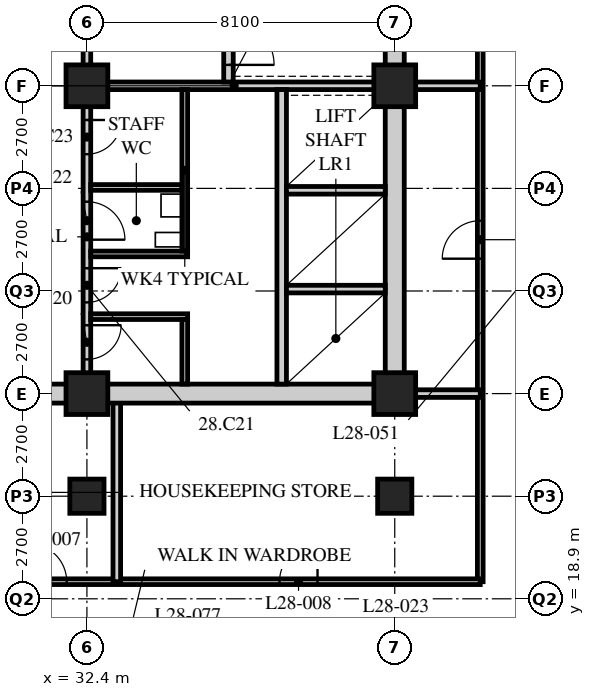
"""IFC4 building model, lengths in metres.
Left out: names, types, materials, properties, quantities, classifications, styles, units other than length and angle.
Written with IfcOpenShell. Run it as: python <this file> out.ifc"""

import sys

from ifc_helpers import new_model, si_unit, direction, frame, frame_2d, origin, origin_2d, place, context, subcontext, project, spatial, rectangle, hollow_rectangle, extrude, element, fill, save


model = new_model("IFC4")
c1 = context("Model", 3, precision=1e-05, world=origin(), true_north=direction((0.0, 1.0)))
c2 = subcontext(c1, "Body", "Model", "MODEL_VIEW")
j1 = project(units=[si_unit("LENGTHUNIT", "METRE"), si_unit("PLANEANGLEUNIT", "RADIAN")], contexts=[c1])
p1 = place(None, origin())
s1 = spatial("IfcSite", under=j1, at=p1, CompositionType="ELEMENT")
p2 = place(p1, origin())
s2 = spatial("IfcBuilding", under=s1, at=p2, CompositionType="ELEMENT")
p3 = place(p2, frame((0.0, 0.0, 113.6)))
s3 = spatial("IfcBuildingStorey", under=s2, at=p3, CompositionType="ELEMENT", Elevation=113.6)
p4 = place(p3, frame((32.4, 21.6, 0.0), z_axis=(0.0, 0.0, 1.0), x_axis=(1.0, 0.0, 0.0)))
e1 = element("IfcColumn", 1, at=p4, inside=s3, PredefinedType="COLUMN", context=c2, shape_type="SweptSolid", body=[
    extrude(hollow_rectangle(XDim=0.9, YDim=0.9, WallThickness=0.09, at=origin_2d()), origin(), (0.0, 0.0, 1.0), 3.4),
])
for number, where, z_axis, x_axis in (
    (2, (32.4, 24.3, 0.0), (0.0, 0.0, 1.0), (1.0, 0.0, 0.0)),
    (3, (32.4, 32.4, 0.0), (0.0, 0.0, 1.0), (1.0, 0.0, 0.0)),
):
    element("IfcColumn", number, at=place(p3, frame(where, z_axis=z_axis, x_axis=x_axis)), inside=s3, PredefinedType="COLUMN", context=c2, shape_type="SweptSolid", body=[
        extrude(hollow_rectangle(XDim=1.1, YDim=1.1, WallThickness=0.1, at=origin_2d()), origin(), (0.0, 0.0, 1.0), 3.4),
    ])
p5 = place(p3, frame((40.5, 21.6, 0.0), z_axis=(0.0, 0.0, 1.0), x_axis=(1.0, 0.0, 0.0)))
e4 = element("IfcColumn", 4, at=p5, inside=s3, PredefinedType="COLUMN", context=c2, shape_type="SweptSolid", body=[
    extrude(hollow_rectangle(XDim=0.9, YDim=0.9, WallThickness=0.09, at=origin_2d()), origin(), (0.0, 0.0, 1.0), 3.4),
])
for number, where, z_axis, x_axis in (
    (5, (40.5, 24.3, 0.0), (0.0, 0.0, 1.0), (1.0, 0.0, 0.0)),
    (6, (40.5, 32.4, 0.0), (0.0, 0.0, 1.0), (1.0, 0.0, 0.0)),
):
    element("IfcColumn", number, at=place(p3, frame(where, z_axis=z_axis, x_axis=x_axis)), inside=s3, PredefinedType="COLUMN", context=c2, shape_type="SweptSolid", body=[
        extrude(hollow_rectangle(XDim=1.1, YDim=1.1, WallThickness=0.1, at=origin_2d()), origin(), (0.0, 0.0, 1.0), 3.4),
    ])
p6 = place(p3, frame((42.75, 19.35, 0.0), z_axis=(0.0, 0.0, 1.0), x_axis=(0.0, 1.0, 0.0)))
e7 = element("IfcWall", 7, at=p6, inside=s3, PredefinedType="PARTITIONING", context=c2, shape_type="SweptSolid", body=[
    extrude(rectangle(XDim=24.75, YDim=0.15, at=frame_2d((12.375, 0.0))), origin(), (0.0, 0.0, 1.0), 3.19),
])
p7 = place(p6, frame((8.5, 0.0, 0.0)))
e8 = element("IfcOpeningElement", 8, at=p7, cuts=e7, PredefinedType="OPENING", context=c2, shape_type="SweptSolid", body=[
    extrude(rectangle(XDim=1.0, YDim=2.1, at=frame_2d((0.5, 1.05))), frame((0.0, 0.085, 0.0), z_axis=(0.0, -1.0, 0.0), x_axis=(1.0, 0.0, 0.0)), (0.0, 0.0, 1.0), 0.17),
])
p8 = place(p6, frame((16.6, 0.0, 0.0)))
e9 = element("IfcOpeningElement", 9, at=p8, cuts=e7, PredefinedType="OPENING", context=c2, shape_type="SweptSolid", body=[
    extrude(rectangle(XDim=1.0, YDim=2.1, at=frame_2d((0.5, 1.05))), frame((0.0, 0.085, 0.0), z_axis=(0.0, -1.0, 0.0), x_axis=(1.0, 0.0, 0.0)), (0.0, 0.0, 1.0), 0.17),
])
p9 = place(p3, frame((29.56, 19.35, 0.0), z_axis=(0.0, 0.0, 1.0), x_axis=(1.0, 0.0, 0.0)))
e10 = element("IfcWall", 10, at=p9, inside=s3, PredefinedType="PARTITIONING", context=c2, shape_type="SweptSolid", body=[
    extrude(rectangle(XDim=13.19, YDim=0.15, at=frame_2d((6.595, 0.0))), origin(), (0.0, 0.0, 1.0), 3.19),
])
p10 = place(p9, frame((1.308, 0.0, 0.0)))
e11 = element("IfcOpeningElement", 11, at=p10, cuts=e10, PredefinedType="OPENING", context=c2, shape_type="SweptSolid", body=[
    extrude(rectangle(XDim=1.0, YDim=2.1, at=frame_2d((0.5, 1.05))), frame((0.0, 0.085, 0.0), z_axis=(0.0, -1.0, 0.0), x_axis=(1.0, 0.0, 0.0)), (0.0, 0.0, 1.0), 0.17),
])
p11 = place(p9, frame((7.908, 0.0, 0.0)))
e12 = element("IfcOpeningElement", 12, at=p11, cuts=e10, PredefinedType="OPENING", context=c2, shape_type="SweptSolid", body=[
    extrude(rectangle(XDim=1.0, YDim=2.1, at=frame_2d((0.5, 1.05))), frame((0.0, 0.085, 0.0), z_axis=(0.0, -1.0, 0.0), x_axis=(1.0, 0.0, 0.0)), (0.0, 0.0, 1.0), 0.17),
])
p12 = place(p3, frame((40.5, 32.4, 0.0), z_axis=(0.0, 0.0, 1.0), x_axis=(1.0, 0.0, 0.0)))
e13 = element("IfcWall", 13, at=p12, inside=s3, PredefinedType="SOLIDWALL", context=c2, shape_type="SweptSolid", body=[
    extrude(rectangle(XDim=2.25, YDim=0.2, at=frame_2d((1.125, 0.0))), origin(), (0.0, 0.0, 1.0), 3.19),
])
p13 = place(p3, frame((33.186, 19.35, 0.0), z_axis=(0.0, 0.0, 1.0), x_axis=(0.0, 1.0, 0.0)))
e14 = element("IfcWall", 14, at=p13, inside=s3, PredefinedType="SOLIDWALL", context=c2, shape_type="SweptSolid", body=[
    extrude(rectangle(XDim=4.95, YDim=0.2, at=frame_2d((2.475, 0.0))), origin(), (0.0, 0.0, 1.0), 3.19),
])
p14 = place(p3, frame((40.5, 24.3, 0.0), z_axis=(0.0, 0.0, 1.0), x_axis=(1.0, 0.0, 0.0)))
e15 = element("IfcWall", 15, at=p14, inside=s3, PredefinedType="SOLIDWALL", context=c2, shape_type="SweptSolid", body=[
    extrude(rectangle(XDim=2.25, YDim=0.2, at=frame_2d((1.125, 0.0))), origin(), (0.0, 0.0, 1.0), 3.19),
])
p15 = place(p3, frame((15.95, 24.3, 0.0), z_axis=(0.0, 0.0, 1.0), x_axis=(1.0, 0.0, 0.0)))
e16 = element("IfcWall", 16, at=p15, inside=s3, PredefinedType="SOLIDWALL", context=c2, shape_type="SweptSolid", body=[
    extrude(rectangle(XDim=24.8, YDim=0.5, at=frame_2d((12.4, 0.0))), origin(), (0.0, 0.0, 1.0), 2.54),
])
p16 = place(p15, frame((11.5, 0.0, 0.0)))
e17 = element("IfcOpeningElement", 17, at=p16, cuts=e16, PredefinedType="OPENING", context=c2, shape_type="SweptSolid", body=[
    extrude(rectangle(XDim=1.8, YDim=2.4, at=frame_2d((0.9, 1.2))), frame((0.0, 0.26, 0.0), z_axis=(0.0, -1.0, 0.0), x_axis=(1.0, 0.0, 0.0)), (0.0, 0.0, 1.0), 0.52),
])
p17 = place(p3, frame((40.5, 24.55, 0.0), z_axis=(0.0, 0.0, 1.0), x_axis=(0.0, 1.0, 0.0)))
e18 = element("IfcWall", 18, at=p17, inside=s3, PredefinedType="SOLIDWALL", context=c2, shape_type="SweptSolid", body=[
    extrude(rectangle(XDim=15.7, YDim=0.5, at=frame_2d((7.85, 0.0))), origin(), (0.0, 0.0, 1.0), 2.578),
])
p18 = place(p3, frame((32.3, 32.4, 0.0), z_axis=(0.0, 0.0, 1.0), x_axis=(1.0, 0.0, 0.0)))
e19 = element("IfcWall", 19, at=p18, inside=s3, PredefinedType="SOLIDWALL", context=c2, shape_type="SweptSolid", body=[
    extrude(rectangle(XDim=7.95, YDim=0.2, at=frame_2d((3.975, 0.0))), origin(), (0.0, 0.0, 1.0), 2.578),
])
p19 = place(p3, frame((32.4, 32.5, 0.0), z_axis=(0.0, 0.0, 1.0), x_axis=(0.0, 1.0, 0.0)))
e20 = element("IfcWall", 20, at=p19, inside=s3, PredefinedType="SOLIDWALL", context=c2, shape_type="SweptSolid", body=[
    extrude(rectangle(XDim=7.75, YDim=0.2, at=frame_2d((3.875, 0.0))), origin(), (0.0, 0.0, 1.0), 2.578),
])
p20 = place(p19, frame((1.9, 0.0, 0.0)))
e21 = element("IfcOpeningElement", 21, at=p20, cuts=e20, PredefinedType="OPENING", context=c2, shape_type="SweptSolid", body=[
    extrude(rectangle(XDim=1.2, YDim=2.1, at=frame_2d((0.6, 1.05))), frame((0.0, 0.11, 0.0), z_axis=(0.0, -1.0, 0.0), x_axis=(1.0, 0.0, 0.0)), (0.0, 0.0, 1.0), 0.22),
])
p21 = place(p3, frame((37.525, 24.55, 0.0), z_axis=(0.0, 0.0, 1.0), x_axis=(0.0, 1.0, 0.0)))
e22 = element("IfcWall", 22, at=p21, inside=s3, PredefinedType="SOLIDWALL", context=c2, shape_type="SweptSolid", body=[
    extrude(rectangle(XDim=7.75, YDim=0.25, at=frame_2d((3.875, 0.0))), origin(), (0.0, 0.0, 1.0), 3.19),
])
for number, where, z_axis, x_axis in (
    (23, (37.65, 27.05, 0.0), (0.0, 0.0, 1.0), (1.0, 0.0, 0.0)),
    (24, (37.65, 29.65, 0.0), (0.0, 0.0, 1.0), (1.0, 0.0, 0.0)),
):
    element("IfcWall", number, at=place(p3, frame(where, z_axis=z_axis, x_axis=x_axis)), inside=s3, PredefinedType="SOLIDWALL", context=c2, shape_type="SweptSolid", body=[
        extrude(rectangle(XDim=2.6, YDim=0.2, at=frame_2d((1.3, 0.0))), origin(), (0.0, 0.0, 1.0), 3.19),
    ])
p22 = place(p3, frame((36.125, 32.5, 0.0), z_axis=(0.0, 0.0, 1.0), x_axis=(0.0, 1.0, 0.0)))
e25 = element("IfcWall", 25, at=p22, inside=s3, PredefinedType="SOLIDWALL", context=c2, shape_type="SweptSolid", body=[
    extrude(rectangle(XDim=7.75, YDim=0.25, at=frame_2d((3.875, 0.0))), origin(), (0.0, 0.0, 1.0), 3.19),
])
p23 = place(p22, frame((0.45, 0.0, 0.0)))
e26 = element("IfcOpeningElement", 26, at=p23, cuts=e25, PredefinedType="OPENING", context=c2, shape_type="SweptSolid", body=[
    extrude(rectangle(XDim=1.2, YDim=2.1, at=frame_2d((0.6, 1.05))), frame((0.0, 0.135, 0.0), z_axis=(0.0, -1.0, 0.0), x_axis=(1.0, 0.0, 0.0)), (0.0, 0.0, 1.0), 0.27),
])
p24 = place(p3, frame((32.4, 24.55, 0.0), z_axis=(0.0, 0.0, 1.0), x_axis=(0.0, 1.0, 0.0)))
e27 = element("IfcWall", 27, at=p24, inside=s3, PredefinedType="PARTITIONING", context=c2, shape_type="SweptSolid", body=[
    extrude(rectangle(XDim=7.75, YDim=0.2, at=frame_2d((3.875, 0.0))), origin(), (0.0, 0.0, 1.0), 2.578),
])
p25 = place(p24, frame((0.65, 0.0, 0.0)))
e28 = element("IfcOpeningElement", 28, at=p25, cuts=e27, PredefinedType="OPENING", context=c2, shape_type="SweptSolid", body=[
    extrude(rectangle(XDim=0.9, YDim=2.1, at=frame_2d((0.45, 1.05))), frame((0.0, 0.11, 0.0), z_axis=(0.0, -1.0, 0.0), x_axis=(1.0, 0.0, 0.0)), (0.0, 0.0, 1.0), 0.22),
])
p26 = place(p24, frame((2.15, 0.0, 0.0)))
e29 = element("IfcOpeningElement", 29, at=p26, cuts=e27, PredefinedType="OPENING", context=c2, shape_type="SweptSolid", body=[
    extrude(rectangle(XDim=0.9, YDim=2.1, at=frame_2d((0.45, 1.05))), frame((0.0, 0.11, 0.0), z_axis=(0.0, -1.0, 0.0), x_axis=(1.0, 0.0, 0.0)), (0.0, 0.0, 1.0), 0.22),
])
p27 = place(p24, frame((3.8, 0.0, 0.0)))
e30 = element("IfcOpeningElement", 30, at=p27, cuts=e27, PredefinedType="OPENING", context=c2, shape_type="SweptSolid", body=[
    extrude(rectangle(XDim=1.0, YDim=2.1, at=frame_2d((0.5, 1.05))), frame((0.0, 0.11, 0.0), z_axis=(0.0, -1.0, 0.0), x_axis=(1.0, 0.0, 0.0)), (0.0, 0.0, 1.0), 0.22),
])
p28 = place(p24, frame((6.05, 0.0, 0.0)))
e31 = element("IfcOpeningElement", 31, at=p28, cuts=e27, PredefinedType="OPENING", context=c2, shape_type="SweptSolid", body=[
    extrude(rectangle(XDim=0.9, YDim=2.1, at=frame_2d((0.45, 1.05))), frame((0.0, 0.11, 0.0), z_axis=(0.0, -1.0, 0.0), x_axis=(1.0, 0.0, 0.0)), (0.0, 0.0, 1.0), 0.22),
])
for number, where, z_axis, x_axis in (
    (32, (32.5, 26.325, 0.0), (0.0, 0.0, 1.0), (1.0, 0.0, 0.0)),
    (33, (32.5, 27.975, 0.0), (0.0, 0.0, 1.0), (1.0, 0.0, 0.0)),
):
    element("IfcWall", number, at=place(p3, frame(where, z_axis=z_axis, x_axis=x_axis)), inside=s3, PredefinedType="PARTITIONING", context=c2, shape_type="SweptSolid", body=[
        extrude(rectangle(XDim=2.55, YDim=0.15, at=frame_2d((1.275, 0.0))), origin(), (0.0, 0.0, 1.0), 3.19),
    ])
p29 = place(p3, frame((32.5, 29.725, 0.0), z_axis=(0.0, 0.0, 1.0), x_axis=(1.0, 0.0, 0.0)))
e34 = element("IfcWall", 34, at=p29, inside=s3, PredefinedType="PARTITIONING", context=c2, shape_type="SweptSolid", body=[
    extrude(rectangle(XDim=2.4, YDim=0.15, at=frame_2d((1.2, 0.0))), origin(), (0.0, 0.0, 1.0), 3.19),
])
p30 = place(p3, frame((34.975, 24.55, 0.0), z_axis=(0.0, 0.0, 1.0), x_axis=(0.0, 1.0, 0.0)))
e35 = element("IfcWall", 35, at=p30, inside=s3, PredefinedType="PARTITIONING", context=c2, shape_type="SweptSolid", body=[
    extrude(rectangle(XDim=1.7, YDim=0.15, at=frame_2d((0.85, 0.0))), origin(), (0.0, 0.0, 1.0), 3.19),
])
p31 = place(p3, frame((34.975, 28.05, 0.0), z_axis=(0.0, 0.0, 1.0), x_axis=(0.0, 1.0, 0.0)))
e36 = element("IfcWall", 36, at=p31, inside=s3, PredefinedType="PARTITIONING", context=c2, shape_type="SweptSolid", body=[
    extrude(rectangle(XDim=4.25, YDim=0.15, at=frame_2d((2.125, 0.0))), origin(), (0.0, 0.0, 1.0), 3.19),
])
p32 = place(p7, origin())
e37 = element("IfcDoor", 37, at=p32, inside=s3, OperationType="SINGLE_SWING_LEFT", PredefinedType="DOOR", context=c2, shape_type="SweptSolid", body=[
    extrude(rectangle(XDim=1.0, YDim=2.1, at=frame_2d((0.5, 1.05))), frame((0.0, 0.025, 0.0), z_axis=(0.0, -1.0, 0.0), x_axis=(1.0, 0.0, 0.0)), (0.0, 0.0, 1.0), 0.05),
])
fill(e8, e37)
p33 = place(p10, origin())
e38 = element("IfcDoor", 38, at=p33, inside=s3, OperationType="SINGLE_SWING_LEFT", PredefinedType="DOOR", context=c2, shape_type="SweptSolid", body=[
    extrude(rectangle(XDim=1.0, YDim=2.1, at=frame_2d((0.5, 1.05))), frame((0.0, 0.025, 0.0), z_axis=(0.0, -1.0, 0.0), x_axis=(1.0, 0.0, 0.0)), (0.0, 0.0, 1.0), 0.05),
])
fill(e11, e38)
p34 = place(p11, origin())
e39 = element("IfcDoor", 39, at=p34, inside=s3, OperationType="SINGLE_SWING_RIGHT", PredefinedType="DOOR", context=c2, shape_type="SweptSolid", body=[
    extrude(rectangle(XDim=1.0, YDim=2.1, at=frame_2d((0.5, 1.05))), frame((0.0, 0.025, 0.0), z_axis=(0.0, -1.0, 0.0), x_axis=(1.0, 0.0, 0.0)), (0.0, 0.0, 1.0), 0.05),
])
fill(e12, e39)
p35 = place(p25, origin())
e40 = element("IfcDoor", 40, at=p35, inside=s3, OperationType="SINGLE_SWING_LEFT", PredefinedType="DOOR", context=c2, shape_type="SweptSolid", body=[
    extrude(rectangle(XDim=0.9, YDim=2.1, at=frame_2d((0.45, 1.05))), frame((0.0, 0.025, 0.0), z_axis=(0.0, -1.0, 0.0), x_axis=(1.0, 0.0, 0.0)), (0.0, 0.0, 1.0), 0.05),
])
fill(e28, e40)
p36 = place(p26, origin())
e41 = element("IfcDoor", 41, at=p36, inside=s3, OperationType="SINGLE_SWING_LEFT", PredefinedType="DOOR", context=c2, shape_type="SweptSolid", body=[
    extrude(rectangle(XDim=0.9, YDim=2.1, at=frame_2d((0.45, 1.05))), frame((0.0, 0.025, 0.0), z_axis=(0.0, -1.0, 0.0), x_axis=(1.0, 0.0, 0.0)), (0.0, 0.0, 1.0), 0.05),
])
fill(e29, e41)
p37 = place(p27, origin())
e42 = element("IfcDoor", 42, at=p37, inside=s3, OperationType="SINGLE_SWING_RIGHT", PredefinedType="DOOR", context=c2, shape_type="SweptSolid", body=[
    extrude(rectangle(XDim=1.0, YDim=2.1, at=frame_2d((0.5, 1.05))), frame((0.0, 0.025, 0.0), z_axis=(0.0, -1.0, 0.0), x_axis=(1.0, 0.0, 0.0)), (0.0, 0.0, 1.0), 0.05),
])
fill(e30, e42)
p38 = place(p28, origin())
e43 = element("IfcDoor", 43, at=p38, inside=s3, OperationType="SINGLE_SWING_LEFT", PredefinedType="DOOR", context=c2, shape_type="SweptSolid", body=[
    extrude(rectangle(XDim=0.9, YDim=2.1, at=frame_2d((0.45, 1.05))), frame((0.0, 0.025, 0.0), z_axis=(0.0, -1.0, 0.0), x_axis=(1.0, 0.0, 0.0)), (0.0, 0.0, 1.0), 0.05),
])
fill(e31, e43)
p39 = place(p23, origin())
e44 = element("IfcDoor", 44, at=p39, inside=s3, OperationType="SINGLE_SWING_RIGHT", PredefinedType="DOOR", context=c2, shape_type="SweptSolid", body=[
    extrude(rectangle(XDim=1.2, YDim=2.1, at=frame_2d((0.6, 1.05))), frame((0.0, 0.025, 0.0), z_axis=(0.0, -1.0, 0.0), x_axis=(1.0, 0.0, 0.0)), (0.0, 0.0, 1.0), 0.05),
])
fill(e26, e44)
save(model, sys.argv[1])
